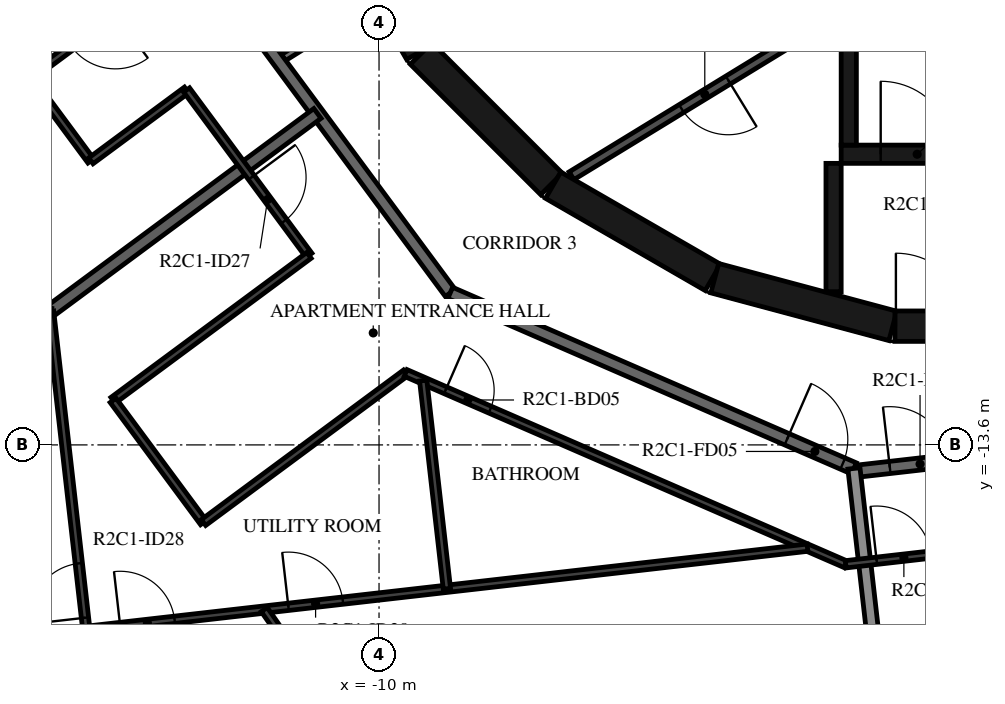
"""IFC4 building model, lengths in metres.
Left out: names, types, materials, properties, quantities, classifications, styles, units other than length and angle.
Written with IfcOpenShell. Run it as: python <this file> out.ifc"""

import sys

from ifc_helpers import new_model, si_unit, direction, frame, frame_2d, origin, place, context, subcontext, project, spatial, rectangle, extrude, element, fill, save


model = new_model("IFC4")
c1 = context("Model", 3, precision=1e-05, world=origin(), true_north=direction((0.0, 1.0)))
c2 = subcontext(c1, "Body", "Model", "MODEL_VIEW")
j1 = project(units=[si_unit("LENGTHUNIT", "METRE"), si_unit("PLANEANGLEUNIT", "RADIAN")], contexts=[c1])
p1 = place(None, origin())
s1 = spatial("IfcSite", under=j1, at=p1, CompositionType="ELEMENT")
p2 = place(p1, origin())
s2 = spatial("IfcBuilding", under=s1, at=p2, CompositionType="ELEMENT")
p3 = place(p2, frame((0.0, 0.0, 101.2)))
s3 = spatial("IfcBuildingStorey", under=s2, at=p3, CompositionType="ELEMENT", Elevation=101.2)
p4 = place(p3, frame((-10.845, -4.51, 0.0), z_axis=(0.0, 0.0, 1.0), x_axis=(0.500087131594, -0.865975092491, 0.0)))
e1 = element("IfcWall", 1, at=p4, inside=s3, PredefinedType="SHEAR", context=c2, shape_type="SweptSolid", body=[
    extrude(rectangle(XDim=3.033, YDim=0.5, at=frame_2d((1.516, 0.0))), origin(), (0.0, 0.0, 1.0), 3.12),
])
p5 = place(p3, frame((-9.308, -7.164, 0.0), z_axis=(0.0, 0.0, 1.0), x_axis=(0.707106781187, -0.707106781187, 0.0)))
e2 = element("IfcWall", 2, at=p5, inside=s3, PredefinedType="SHEAR", context=c2, shape_type="SweptSolid", body=[
    extrude(rectangle(XDim=3.032, YDim=0.5, at=frame_2d((1.516, 0.0))), origin(), (0.0, 0.0, 1.0), 3.12),
])
for number, where, z_axis, x_axis in (
    (3, (-7.137, -9.329, 0.0), (0.0, 0.0, 1.0), (0.866, -0.5, 0.0)),
    (4, (-4.479, -10.858, 0.0), (0.0, 0.0, 1.0), (0.966, -0.259, 0.0)),
):
    element("IfcWall", number, at=place(p3, frame(where, z_axis=z_axis, x_axis=x_axis)), inside=s3, PredefinedType="SHEAR", context=c2, shape_type="SweptSolid", body=[
        extrude(rectangle(XDim=3.033, YDim=0.5, at=frame_2d((1.516, 0.0))), origin(), (0.0, 0.0, 1.0), 3.12),
    ])
p6 = place(p3, frame((-1.516, -11.647, 0.0), z_axis=(0.0, 0.0, 1.0), x_axis=(1.0, 0.0, 0.0)))
e5 = element("IfcWall", 5, at=p6, inside=s3, PredefinedType="SHEAR", context=c2, shape_type="SweptSolid", body=[
    extrude(rectangle(XDim=3.033, YDim=0.5, at=frame_2d((1.516, 0.0))), origin(), (0.0, 0.0, 1.0), 3.12),
])
p7 = place(p6, frame((0.016, 0.0, 0.0)))
e6 = element("IfcOpeningElement", 6, at=p7, cuts=e5, PredefinedType="OPENING", context=c2, shape_type="SweptSolid", body=[
    extrude(rectangle(XDim=1.2, YDim=2.1, at=frame_2d((0.6, 1.05))), frame((0.0, 0.26, 0.0), z_axis=(0.0, -1.0, 0.0), x_axis=(1.0, 0.0, 0.0)), (0.0, 0.0, 1.0), 0.52),
])
p8 = place(p3, frame((-2.275, -8.67, 0.0), z_axis=(0.0, 0.0, 1.0), x_axis=(0.0, 1.0, 0.0)))
e7 = element("IfcWall", 7, at=p8, inside=s3, PredefinedType="SHEAR", context=c2, shape_type="SweptSolid", body=[
    extrude(rectangle(XDim=3.32, YDim=0.25, at=frame_2d((1.66, 0.0))), origin(), (0.0, 0.0, 1.0), 3.12),
])
p9 = place(p3, frame((-2.4, -8.82, 0.0), z_axis=(0.0, 0.0, 1.0), x_axis=(1.0, 0.0, 0.0)))
e8 = element("IfcWall", 8, at=p9, inside=s3, PredefinedType="SHEAR", context=c2, shape_type="SweptSolid", body=[
    extrude(rectangle(XDim=2.5, YDim=0.3, at=frame_2d((1.25, 0.0))), origin(), (0.0, 0.0, 1.0), 3.12),
])
p10 = place(p9, frame((0.65, 0.0, 0.0)))
e9 = element("IfcOpeningElement", 9, at=p10, cuts=e8, PredefinedType="OPENING", context=c2, shape_type="SweptSolid", body=[
    extrude(rectangle(XDim=1.2, YDim=2.1, at=frame_2d((0.6, 1.05))), frame((0.0, 0.16, 0.0), z_axis=(0.0, -1.0, 0.0), x_axis=(1.0, 0.0, 0.0)), (0.0, 0.0, 1.0), 0.32),
])
p11 = place(p3, frame((-2.525, -8.97, 0.0), z_axis=(0.0, 0.0, 1.0), x_axis=(0.0, -1.0, 0.0)))
e10 = element("IfcWall", 10, at=p11, inside=s3, PredefinedType="SHEAR", context=c2, shape_type="SweptSolid", body=[
    extrude(rectangle(XDim=2.11, YDim=0.25, at=frame_2d((1.055, 0.0))), origin(), (0.0, 0.0, 1.0), 3.12),
])
p12 = place(p3, frame((-2.451, -6.495, 0.0), z_axis=(0.0, 0.0, 1.0), x_axis=(-0.853250115418, -0.521501908471, 0.0)))
e11 = element("IfcWall", 11, at=p12, inside=s3, PredefinedType="PARTITIONING", context=c2, shape_type="SweptSolid", body=[
    extrude(rectangle(XDim=5.137, YDim=0.15, at=frame_2d((2.569, 0.0))), origin(), (0.0, 0.0, 1.0), 3.12),
])
p13 = place(p12, frame((2.119, 0.0, 0.0)))
e12 = element("IfcOpeningElement", 12, at=p13, cuts=e11, PredefinedType="OPENING", context=c2, shape_type="SweptSolid", body=[
    extrude(rectangle(XDim=0.9, YDim=2.1, at=frame_2d((0.45, 1.05))), frame((0.0, 0.085, 0.0), z_axis=(0.0, -1.0, 0.0), x_axis=(1.0, 0.0, 0.0)), (0.0, 0.0, 1.0), 0.17),
])
p14 = place(p3, frame((-11.654, -7.282, 0.0), z_axis=(0.0, 0.0, 1.0), x_axis=(0.848117698675, 0.529807860638, 0.0)))
e13 = element("IfcWall", 13, at=p14, inside=s3, PredefinedType="PARTITIONING", context=c2, shape_type="SweptSolid", body=[
    extrude(rectangle(XDim=1.838, YDim=0.12, at=frame_2d((0.919, 0.0))), origin(), (0.0, 0.0, 1.0), 3.12),
])
p15 = place(p14, frame((0.115, 0.0, 0.0)))
e14 = element("IfcOpeningElement", 14, at=p15, cuts=e13, PredefinedType="OPENING", context=c2, shape_type="SweptSolid", body=[
    extrude(rectangle(XDim=1.2, YDim=2.1, at=frame_2d((0.6, 1.05))), frame((0.0, 0.07, 0.0), z_axis=(0.0, -1.0, 0.0), x_axis=(1.0, 0.0, 0.0)), (0.0, 0.0, 1.0), 0.14),
])
p16 = place(p3, frame((-13.196, -5.198, 0.0), z_axis=(0.0, 0.0, 1.0), x_axis=(0.594805187394, -0.803869883159, 0.0)))
e15 = element("IfcWall", 15, at=p16, inside=s3, PredefinedType="STANDARD", context=c2, shape_type="SweptSolid", body=[
    extrude(rectangle(XDim=7.342, YDim=0.2, at=frame_2d((3.671, 0.0))), origin(), (0.0, 0.0, 1.0), 3.12),
])
p17 = place(p3, frame((-8.829, -11.1, 0.0), z_axis=(0.0, 0.0, 1.0), x_axis=(0.917063622491, -0.398740908742, 0.0)))
e16 = element("IfcWall", 16, at=p17, inside=s3, PredefinedType="STANDARD", context=c2, shape_type="SweptSolid", body=[
    extrude(rectangle(XDim=7.24, YDim=0.2, at=frame_2d((3.62, 0.0))), origin(), (0.0, 0.0, 1.0), 3.12),
])
p18 = place(p17, frame((6.04, 0.0, 0.0)))
e17 = element("IfcOpeningElement", 17, at=p18, cuts=e16, PredefinedType="OPENING", context=c2, shape_type="SweptSolid", body=[
    extrude(rectangle(XDim=1.0, YDim=2.1, at=frame_2d((0.5, 1.05))), frame((0.0, 0.11, 0.0), z_axis=(0.0, -1.0, 0.0), x_axis=(1.0, 0.0, 0.0)), (0.0, 0.0, 1.0), 0.22),
])
p19 = place(p3, frame((-2.096, -14.028, 0.0), z_axis=(0.0, 0.0, 1.0), x_axis=(0.993569170114, 0.113226782163, 0.0)))
e18 = element("IfcWall", 18, at=p19, inside=s3, PredefinedType="STANDARD", context=c2, shape_type="SweptSolid", body=[
    extrude(rectangle(XDim=7.342, YDim=0.2, at=frame_2d((3.671, 0.0))), origin(), (0.0, 0.0, 1.0), 3.12),
])
p20 = place(p19, frame((0.5, 0.0, 0.0)))
e19 = element("IfcOpeningElement", 19, at=p20, cuts=e18, PredefinedType="OPENING", context=c2, shape_type="SweptSolid", body=[
    extrude(rectangle(XDim=1.0, YDim=2.1, at=frame_2d((0.5, 1.05))), frame((0.0, 0.11, 0.0), z_axis=(0.0, -1.0, 0.0), x_axis=(1.0, 0.0, 0.0)), (0.0, 0.0, 1.0), 0.22),
])
p21 = place(p3, frame((-16.649, -12.32, 0.0), z_axis=(0.0, 0.0, 1.0), x_axis=(0.803869204071, 0.594806105169, 0.0)))
e20 = element("IfcWall", 20, at=p21, inside=s3, PredefinedType="STANDARD", context=c2, shape_type="SweptSolid", body=[
    extrude(rectangle(XDim=7.011, YDim=0.2, at=frame_2d((3.506, 0.0))), origin(), (0.0, 0.0, 1.0), 3.12),
])
p22 = place(p3, frame((-1.555, -19.559, 0.0), z_axis=(0.0, 0.0, 1.0), x_axis=(-0.113221250863, 0.993569800443, 0.0)))
e21 = element("IfcWall", 21, at=p22, inside=s3, PredefinedType="STANDARD", context=c2, shape_type="SweptSolid", body=[
    extrude(rectangle(XDim=5.609, YDim=0.2, at=frame_2d((2.804, 0.0))), origin(), (0.0, 0.0, 1.0), 2.73),
])
p23 = place(p3, frame((-14.175, -6.397, 0.0), z_axis=(0.0, 0.0, 1.0), x_axis=(-0.803901491033, -0.594762467474, 0.0)))
e22 = element("IfcWall", 22, at=p23, inside=s3, PredefinedType="PARTITIONING", context=c2, shape_type="SweptSolid", body=[
    extrude(rectangle(XDim=1.959, YDim=0.12, at=frame_2d((0.979, 0.0))), origin(), (0.0, 0.0, 1.0), 3.12),
])
p24 = place(p23, frame((0.2, 0.0, 0.0)))
e23 = element("IfcOpeningElement", 23, at=p24, cuts=e22, PredefinedType="OPENING", context=c2, shape_type="SweptSolid", body=[
    extrude(rectangle(XDim=0.9, YDim=2.1, at=frame_2d((0.45, 1.05))), frame((0.0, 0.07, 0.0), z_axis=(0.0, -1.0, 0.0), x_axis=(1.0, 0.0, 0.0)), (0.0, 0.0, 1.0), 0.14),
])
p25 = place(p3, frame((-15.75, -7.562, 0.0), z_axis=(0.0, 0.0, 1.0), x_axis=(0.594863421241, -0.803826791087, 0.0)))
e24 = element("IfcWall", 24, at=p25, inside=s3, PredefinedType="PARTITIONING", context=c2, shape_type="SweptSolid", body=[
    extrude(rectangle(XDim=1.7, YDim=0.12, at=frame_2d((0.85, 0.0))), origin(), (0.0, 0.0, 1.0), 3.12),
])
p26 = place(p3, frame((-14.739, -8.929, 0.0), z_axis=(0.0, 0.0, 1.0), x_axis=(0.803901491033, 0.594762467474, 0.0)))
e25 = element("IfcWall", 25, at=p26, inside=s3, PredefinedType="PARTITIONING", context=c2, shape_type="SweptSolid", body=[
    extrude(rectangle(XDim=1.959, YDim=0.12, at=frame_2d((0.979, 0.0))), origin(), (0.0, 0.0, 1.0), 3.12),
])
p27 = place(p3, frame((-13.164, -7.764, 0.0), z_axis=(0.0, 0.0, 1.0), x_axis=(0.594837409261, -0.803846040324, 0.0)))
e26 = element("IfcWall", 26, at=p27, inside=s3, PredefinedType="PARTITIONING", context=c2, shape_type="SweptSolid", body=[
    extrude(rectangle(XDim=3.383, YDim=0.12, at=frame_2d((1.691, 0.0))), origin(), (0.0, 0.0, 1.0), 3.12),
])
p28 = place(p27, frame((1.789, 0.0, 0.0)))
e27 = element("IfcOpeningElement", 27, at=p28, cuts=e26, PredefinedType="OPENING", context=c2, shape_type="SweptSolid", body=[
    extrude(rectangle(XDim=0.9, YDim=2.1, at=frame_2d((0.45, 1.05))), frame((0.0, 0.07, 0.0), z_axis=(0.0, -1.0, 0.0), x_axis=(1.0, 0.0, 0.0)), (0.0, 0.0, 1.0), 0.14),
])
p29 = place(p3, frame((-11.152, -10.483, 0.0), z_axis=(0.0, 0.0, 1.0), x_axis=(-0.803843064298, -0.594841430954, 0.0)))
e28 = element("IfcWall", 28, at=p29, inside=s3, PredefinedType="PARTITIONING", context=c2, shape_type="SweptSolid", body=[
    extrude(rectangle(XDim=4.008, YDim=0.12, at=frame_2d((2.004, 0.0))), origin(), (0.0, 0.0, 1.0), 3.12),
])
p30 = place(p3, frame((-14.374, -12.867, 0.0), z_axis=(0.0, 0.0, 1.0), x_axis=(0.594800097121, -0.803873649565, 0.0)))
e29 = element("IfcWall", 29, at=p30, inside=s3, PredefinedType="PARTITIONING", context=c2, shape_type="SweptSolid", body=[
    extrude(rectangle(XDim=2.5, YDim=0.12, at=frame_2d((1.25, 0.0))), origin(), (0.0, 0.0, 1.0), 3.12),
])
p31 = place(p3, frame((-12.886, -14.877, 0.0), z_axis=(0.0, 0.0, 1.0), x_axis=(0.803816491389, 0.594877338761, 0.0)))
e30 = element("IfcWall", 30, at=p31, inside=s3, PredefinedType="PARTITIONING", context=c2, shape_type="SweptSolid", body=[
    extrude(rectangle(XDim=4.135, YDim=0.12, at=frame_2d((2.068, 0.0))), origin(), (0.0, 0.0, 1.0), 3.12),
])
p32 = place(p3, frame((-9.562, -12.417, 0.0), z_axis=(0.0, 0.0, 1.0), x_axis=(0.917063169851, -0.398741949767, 0.0)))
e31 = element("IfcWall", 31, at=p32, inside=s3, PredefinedType="PARTITIONING", context=c2, shape_type="SweptSolid", body=[
    extrude(rectangle(XDim=7.891, YDim=0.12, at=frame_2d((3.946, 0.0))), origin(), (0.0, 0.0, 1.0), 3.12),
])
p33 = place(p32, frame((0.715, 0.0, 0.0)))
e32 = element("IfcOpeningElement", 32, at=p33, cuts=e31, PredefinedType="OPENING", context=c2, shape_type="SweptSolid", body=[
    extrude(rectangle(XDim=0.8, YDim=2.1, at=frame_2d((0.4, 1.05))), frame((0.0, 0.07, 0.0), z_axis=(0.0, -1.0, 0.0), x_axis=(1.0, 0.0, 0.0)), (0.0, 0.0, 1.0), 0.14),
])
p34 = place(p3, frame((-2.326, -15.563, 0.0), z_axis=(0.0, 0.0, 1.0), x_axis=(0.993575068384, 0.113175012641, 0.0)))
e33 = element("IfcWall", 33, at=p34, inside=s3, PredefinedType="PARTITIONING", context=c2, shape_type="SweptSolid", body=[
    extrude(rectangle(XDim=3.799, YDim=0.12, at=frame_2d((1.899, 0.0))), origin(), (0.0, 0.0, 1.0), 3.12),
])
p35 = place(p34, frame((0.513, 0.0, 0.0)))
e34 = element("IfcOpeningElement", 34, at=p35, cuts=e33, PredefinedType="OPENING", context=c2, shape_type="SweptSolid", body=[
    extrude(rectangle(XDim=0.9, YDim=2.1, at=frame_2d((0.45, 1.05))), frame((0.0, 0.07, 0.0), z_axis=(0.0, -1.0, 0.0), x_axis=(1.0, 0.0, 0.0)), (0.0, 0.0, 1.0), 0.14),
])
p36 = place(p3, frame((-17.437, -16.94, 0.0), z_axis=(0.0, 0.0, 1.0), x_axis=(0.993573314119, 0.113190412448, 0.0)))
e35 = element("IfcWall", 35, at=p36, inside=s3, PredefinedType="PARTITIONING", context=c2, shape_type="SweptSolid", body=[
    extrude(rectangle(XDim=14.576, YDim=0.12, at=frame_2d((7.288, 0.0))), origin(), (0.0, 0.0, 1.0), 3.12),
])
p37 = place(p36, frame((3.201, 0.0, 0.0)))
e36 = element("IfcOpeningElement", 36, at=p37, cuts=e35, PredefinedType="OPENING", context=c2, shape_type="SweptSolid", body=[
    extrude(rectangle(XDim=0.9, YDim=2.1, at=frame_2d((0.45, 1.05))), frame((0.0, 0.07, 0.0), z_axis=(0.0, -1.0, 0.0), x_axis=(1.0, 0.0, 0.0)), (0.0, 0.0, 1.0), 0.14),
])
p38 = place(p36, frame((5.985, 0.0, 0.0)))
e37 = element("IfcOpeningElement", 37, at=p38, cuts=e35, PredefinedType="OPENING", context=c2, shape_type="SweptSolid", body=[
    extrude(rectangle(XDim=0.9, YDim=2.1, at=frame_2d((0.45, 1.05))), frame((0.0, 0.07, 0.0), z_axis=(0.0, -1.0, 0.0), x_axis=(1.0, 0.0, 0.0)), (0.0, 0.0, 1.0), 0.14),
])
p39 = place(p3, frame((-14.813, -16.641, 0.0), z_axis=(0.0, 0.0, 1.0), x_axis=(-0.113210971478, 0.993570971767, 0.0)))
e38 = element("IfcWall", 38, at=p39, inside=s3, PredefinedType="PARTITIONING", context=c2, shape_type="SweptSolid", body=[
    extrude(rectangle(XDim=5.273, YDim=0.12, at=frame_2d((2.636, 0.0))), origin(), (0.0, 0.0, 1.0), 3.12),
])
p40 = place(p39, frame((0.2, 0.0, 0.0)))
e39 = element("IfcOpeningElement", 39, at=p40, cuts=e38, PredefinedType="OPENING", context=c2, shape_type="SweptSolid", body=[
    extrude(rectangle(XDim=0.9, YDim=2.1, at=frame_2d((0.45, 1.05))), frame((0.0, 0.07, 0.0), z_axis=(0.0, -1.0, 0.0), x_axis=(1.0, 0.0, 0.0)), (0.0, 0.0, 1.0), 0.14),
])
p41 = place(p3, frame((-8.884, -15.966, 0.0), z_axis=(0.0, 0.0, 1.0), x_axis=(-0.113230836929, 0.993568708026, 0.0)))
e40 = element("IfcWall", 40, at=p41, inside=s3, PredefinedType="PARTITIONING", context=c2, shape_type="SweptSolid", body=[
    extrude(rectangle(XDim=3.446, YDim=0.12, at=frame_2d((1.723, 0.0))), origin(), (0.0, 0.0, 1.0), 3.12),
])
p42 = place(p3, frame((-9.026, -20.41, 0.0), z_axis=(0.0, 0.0, 1.0), x_axis=(-0.57218083256, 0.82012748695, 0.0)))
e41 = element("IfcWall", 41, at=p42, inside=s3, PredefinedType="PARTITIONING", context=c2, shape_type="SweptSolid", body=[
    extrude(rectangle(XDim=5.002, YDim=0.12, at=frame_2d((2.501, 0.0))), origin(), (0.0, 0.0, 1.0), 3.12),
])
p43 = place(p10, origin())
e42 = element("IfcDoor", 42, at=p43, inside=s3, OperationType="SINGLE_SWING_LEFT", PredefinedType="DOOR", context=c2, shape_type="SweptSolid", body=[
    extrude(rectangle(XDim=1.2, YDim=2.1, at=frame_2d((0.6, 1.05))), frame((0.0, 0.025, 0.0), z_axis=(0.0, -1.0, 0.0), x_axis=(1.0, 0.0, 0.0)), (0.0, 0.0, 1.0), 0.05),
])
fill(e9, e42)
p44 = place(p7, origin())
e43 = element("IfcDoor", 43, at=p44, inside=s3, OperationType="SINGLE_SWING_RIGHT", PredefinedType="DOOR", context=c2, shape_type="SweptSolid", body=[
    extrude(rectangle(XDim=1.2, YDim=2.1, at=frame_2d((0.6, 1.05))), frame((0.0, 0.025, 0.0), z_axis=(0.0, -1.0, 0.0), x_axis=(1.0, 0.0, 0.0)), (0.0, 0.0, 1.0), 0.05),
])
fill(e6, e43)
p45 = place(p13, origin())
e44 = element("IfcDoor", 44, at=p45, inside=s3, OperationType="SINGLE_SWING_RIGHT", PredefinedType="DOOR", context=c2, shape_type="SweptSolid", body=[
    extrude(rectangle(XDim=0.9, YDim=2.1, at=frame_2d((0.45, 1.05))), frame((0.0, 0.025, 0.0), z_axis=(0.0, -1.0, 0.0), x_axis=(1.0, 0.0, 0.0)), (0.0, 0.0, 1.0), 0.05),
])
fill(e12, e44)
p46 = place(p18, origin())
e45 = element("IfcDoor", 45, at=p46, inside=s3, OperationType="SINGLE_SWING_LEFT", PredefinedType="DOOR", context=c2, shape_type="SweptSolid", body=[
    extrude(rectangle(XDim=1.0, YDim=2.1, at=frame_2d((0.5, 1.05))), frame((0.0, 0.025, 0.0), z_axis=(0.0, -1.0, 0.0), x_axis=(1.0, 0.0, 0.0)), (0.0, 0.0, 1.0), 0.05),
])
fill(e17, e45)
p47 = place(p28, origin())
e46 = element("IfcDoor", 46, at=p47, inside=s3, OperationType="SINGLE_SWING_LEFT", PredefinedType="DOOR", context=c2, shape_type="SweptSolid", body=[
    extrude(rectangle(XDim=0.9, YDim=2.1, at=frame_2d((0.45, 1.05))), frame((0.0, 0.025, 0.0), z_axis=(0.0, -1.0, 0.0), x_axis=(1.0, 0.0, 0.0)), (0.0, 0.0, 1.0), 0.05),
])
fill(e27, e46)
p48 = place(p33, origin())
e47 = element("IfcDoor", 47, at=p48, inside=s3, OperationType="SINGLE_SWING_LEFT", PredefinedType="DOOR", context=c2, shape_type="SweptSolid", body=[
    extrude(rectangle(XDim=0.8, YDim=2.1, at=frame_2d((0.4, 1.05))), frame((0.0, 0.025, 0.0), z_axis=(0.0, -1.0, 0.0), x_axis=(1.0, 0.0, 0.0)), (0.0, 0.0, 1.0), 0.05),
])
fill(e32, e47)
p49 = place(p40, origin())
e48 = element("IfcDoor", 48, at=p49, inside=s3, OperationType="SINGLE_SWING_LEFT", PredefinedType="DOOR", context=c2, shape_type="SweptSolid", body=[
    extrude(rectangle(XDim=0.9, YDim=2.1, at=frame_2d((0.45, 1.05))), frame((0.0, 0.025, 0.0), z_axis=(0.0, -1.0, 0.0), x_axis=(1.0, 0.0, 0.0)), (0.0, 0.0, 1.0), 0.05),
])
fill(e39, e48)
p50 = place(p37, origin())
e49 = element("IfcDoor", 49, at=p50, inside=s3, OperationType="SINGLE_SWING_LEFT", PredefinedType="DOOR", context=c2, shape_type="SweptSolid", body=[
    extrude(rectangle(XDim=0.9, YDim=2.1, at=frame_2d((0.45, 1.05))), frame((0.0, 0.025, 0.0), z_axis=(0.0, -1.0, 0.0), x_axis=(1.0, 0.0, 0.0)), (0.0, 0.0, 1.0), 0.05),
])
fill(e36, e49)
p51 = place(p38, origin())
e50 = element("IfcDoor", 50, at=p51, inside=s3, OperationType="SINGLE_SWING_LEFT", PredefinedType="DOOR", context=c2, shape_type="SweptSolid", body=[
    extrude(rectangle(XDim=0.9, YDim=2.1, at=frame_2d((0.45, 1.05))), frame((0.0, 0.025, 0.0), z_axis=(0.0, -1.0, 0.0), x_axis=(1.0, 0.0, 0.0)), (0.0, 0.0, 1.0), 0.05),
])
fill(e37, e50)
p52 = place(p20, origin())
e51 = element("IfcDoor", 51, at=p52, inside=s3, OperationType="SINGLE_SWING_LEFT", PredefinedType="DOOR", context=c2, shape_type="SweptSolid", body=[
    extrude(rectangle(XDim=1.0, YDim=2.1, at=frame_2d((0.5, 1.05))), frame((0.0, 0.025, 0.0), z_axis=(0.0, -1.0, 0.0), x_axis=(1.0, 0.0, 0.0)), (0.0, 0.0, 1.0), 0.05),
])
fill(e19, e51)
p53 = place(p35, origin())
e52 = element("IfcDoor", 52, at=p53, inside=s3, OperationType="SINGLE_SWING_LEFT", PredefinedType="DOOR", context=c2, shape_type="SweptSolid", body=[
    extrude(rectangle(XDim=0.9, YDim=2.1, at=frame_2d((0.45, 1.05))), frame((0.0, 0.025, 0.0), z_axis=(0.0, -1.0, 0.0), x_axis=(1.0, 0.0, 0.0)), (0.0, 0.0, 1.0), 0.05),
])
fill(e34, e52)
p54 = place(p15, origin())
e53 = element("IfcDoor", 53, at=p54, inside=s3, OperationType="DOUBLE_DOOR_SINGLE_SWING", PredefinedType="DOOR", context=c2, shape_type="SweptSolid", body=[
    extrude(rectangle(XDim=1.2, YDim=2.1, at=frame_2d((0.6, 1.05))), frame((0.0, 0.025, 0.0), z_axis=(0.0, -1.0, 0.0), x_axis=(1.0, 0.0, 0.0)), (0.0, 0.0, 1.0), 0.05),
])
fill(e14, e53)
save(model, sys.argv[1])
